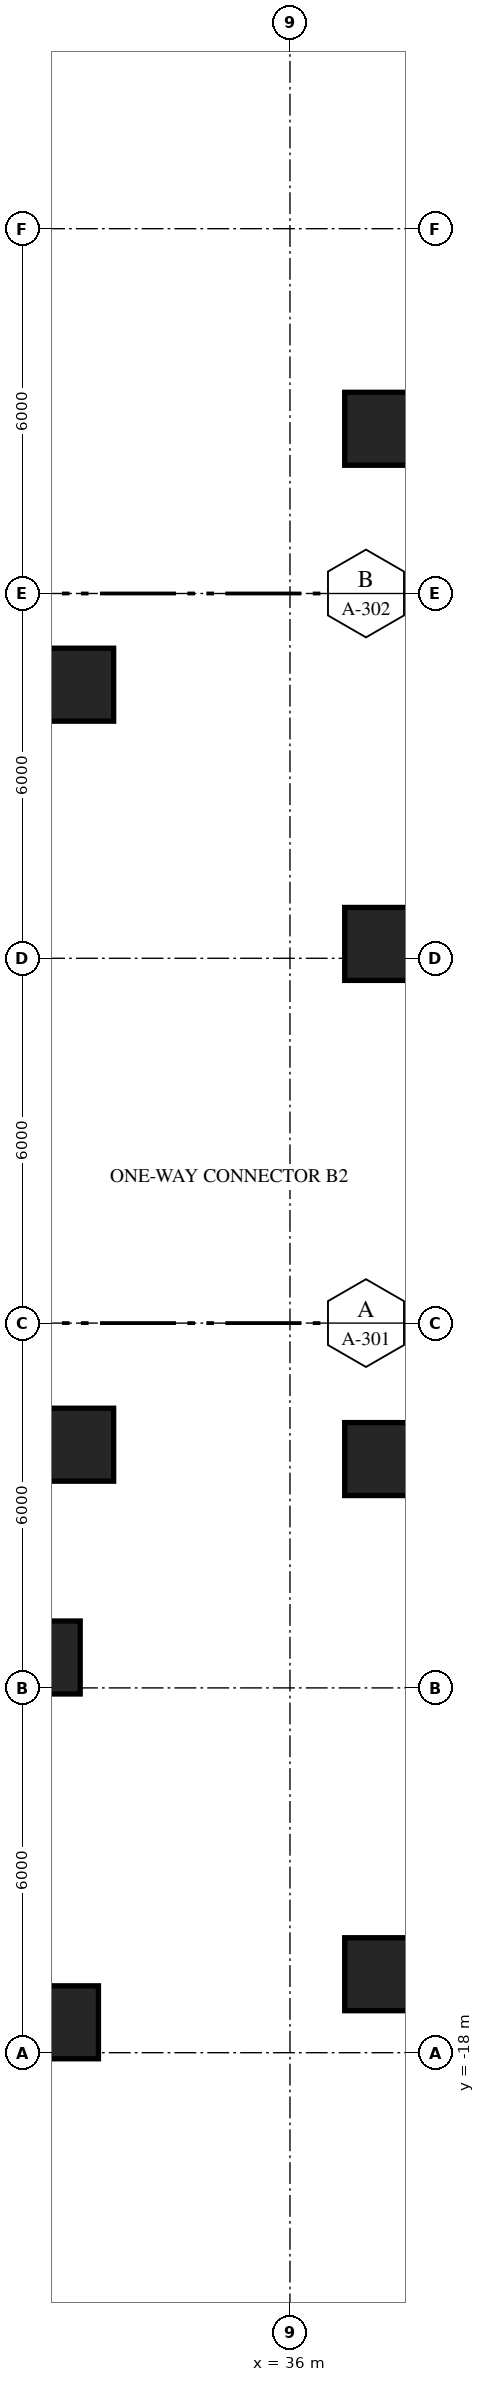
"""IFC4 building model, lengths in metres.
Left out: names, types, materials, properties, quantities, classifications, styles, units other than length and angle.
Written with IfcOpenShell. Run it as: python <this file> out.ifc"""

import sys

from ifc_helpers import new_model, si_unit, direction, frame, origin, origin_2d, place, context, subcontext, project, spatial, rectangle, extrude, element, save


model = new_model("IFC4")
c1 = context("Model", 3, precision=1e-05, world=origin(), true_north=direction((0.0, 1.0)))
c2 = subcontext(c1, "Body", "Model", "MODEL_VIEW")
j1 = project(units=[si_unit("LENGTHUNIT", "METRE"), si_unit("PLANEANGLEUNIT", "RADIAN")], contexts=[c1])
p1 = place(None, origin())
s1 = spatial("IfcSite", under=j1, at=p1, CompositionType="ELEMENT")
p2 = place(p1, origin())
s2 = spatial("IfcBuilding", under=s1, at=p2, CompositionType="ELEMENT")
p3 = place(p2, frame((0.0, 0.0, -8.4)))
s3 = spatial("IfcBuildingStorey", under=s2, at=p3, CompositionType="ELEMENT", Elevation=-8.4)
for number, where, z_axis, x_axis in (
    (1, (32.25, -17.5, 0.0), (0.0, 0.0, 1.0), (1.0, 0.0, 0.0)),
    (2, (37.5, -16.709, 0.0), (0.0, 0.0, 1.0), (1.0, 0.0, 0.0)),
    (3, (31.95, -11.5, 0.0), (0.0, 0.0, 1.0), (1.0, 0.0, 0.0)),
    (4, (37.5, -8.236, 0.0), (0.0, 0.0, 1.0), (1.0, 0.0, 0.0)),
    (5, (32.5, -8.0, 0.0), (0.0, 0.0, 1.0), (1.0, 0.0, 0.0)),
    (6, (37.5, 0.236, 0.0), (0.0, 0.0, 1.0), (1.0, 0.0, 0.0)),
    (7, (32.5, 4.5, 0.0), (0.0, 0.0, 1.0), (1.0, 0.0, 0.0)),
    (8, (37.5, 8.709, 0.0), (0.0, 0.0, 1.0), (1.0, 0.0, 0.0)),
):
    element("IfcColumn", number, at=place(p3, frame(where, z_axis=z_axis, x_axis=x_axis)), inside=s3, PredefinedType="COLUMN", context=c2, shape_type="SweptSolid", body=[
        extrude(rectangle(XDim=1.2, YDim=1.2, at=origin_2d()), origin(), (0.0, 0.0, 1.0), 4.2),
    ])
save(model, sys.argv[1])
